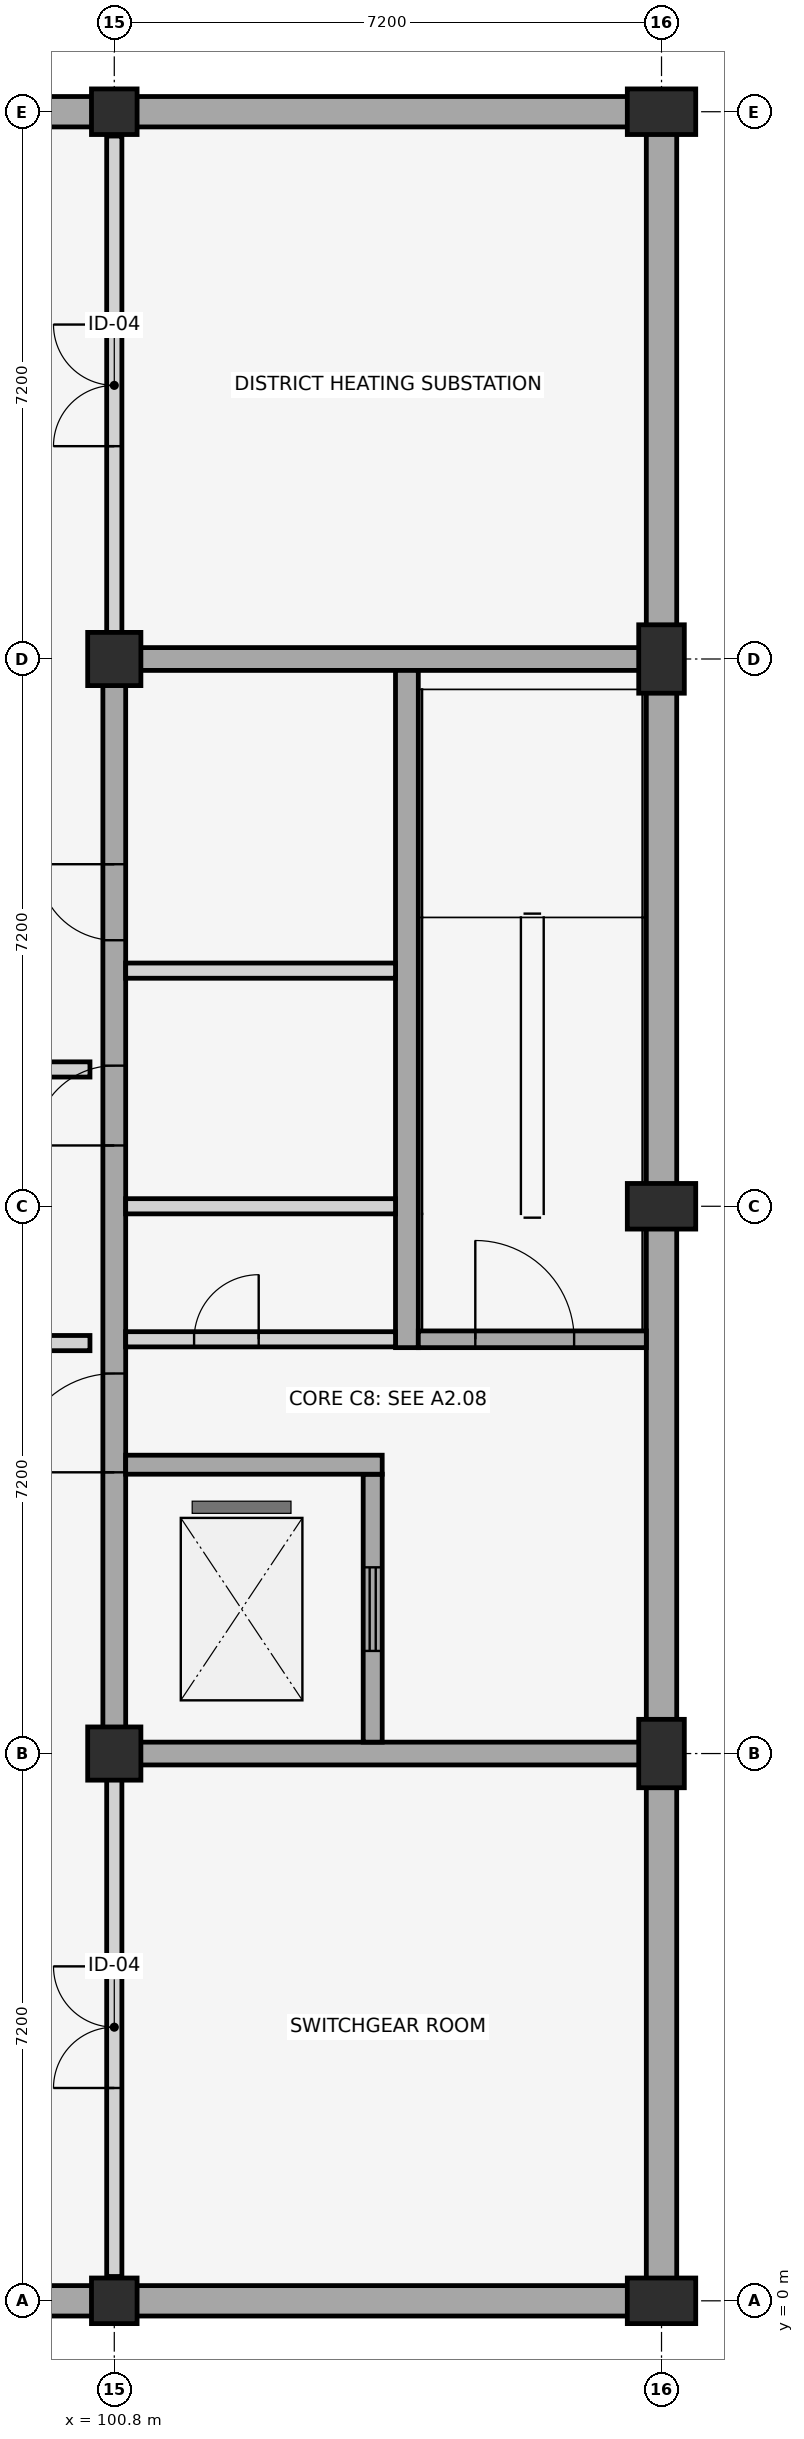
"""IFC4 building model, lengths in metres.
Left out: names, types, materials, properties, quantities, classifications, styles, units other than length and angle.
Written with IfcOpenShell. Run it as: python <this file> out.ifc"""

import sys

from ifc_helpers import new_model, si_unit, direction, frame, frame_2d, origin, origin_2d, place, context, subcontext, project, spatial, rectangle, extrude, element, fill, save


model = new_model("IFC4")
c1 = context("Model", 3, precision=1e-05, world=origin(), true_north=direction((0.0, 1.0)))
c2 = subcontext(c1, "Body", "Model", "MODEL_VIEW")
j1 = project(units=[si_unit("LENGTHUNIT", "METRE"), si_unit("PLANEANGLEUNIT", "RADIAN")], contexts=[c1])
p1 = place(None, origin())
s1 = spatial("IfcSite", under=j1, at=p1, CompositionType="ELEMENT")
p2 = place(p1, origin())
s2 = spatial("IfcBuilding", under=s1, at=p2, CompositionType="ELEMENT")
p3 = place(p2, frame((0.0, 0.0, -4.5)))
s3 = spatial("IfcBuildingStorey", under=s2, at=p3, CompositionType="ELEMENT", Elevation=-4.5)
p4 = place(p3, frame((57.4, 0.0, 0.0), z_axis=(0.0, 0.0, 1.0), x_axis=(1.0, 0.0, 0.0)))
e1 = element("IfcWall", 1, at=p4, inside=s3, PredefinedType="USERDEFINED", context=c2, shape_type="SweptSolid", body=[
    extrude(rectangle(XDim=50.8, YDim=0.4, at=frame_2d((25.4, 0.0))), origin(), (0.0, 0.0, 1.0), 3.67),
])
p5 = place(p3, frame((108.0, 0.2, 0.0), z_axis=(0.0, 0.0, 1.0), x_axis=(0.0, 1.0, 0.0)))
e2 = element("IfcWall", 2, at=p5, inside=s3, PredefinedType="USERDEFINED", context=c2, shape_type="SweptSolid", body=[
    extrude(rectangle(XDim=28.4, YDim=0.4, at=frame_2d((14.2, 0.0))), origin(), (0.0, 0.0, 1.0), 3.67),
])
p6 = place(p3, frame((108.2, 28.8, 0.0), z_axis=(0.0, 0.0, 1.0), x_axis=(-1.0, 0.0, 0.0)))
e3 = element("IfcWall", 3, at=p6, inside=s3, PredefinedType="USERDEFINED", context=c2, shape_type="SweptSolid", body=[
    extrude(rectangle(XDim=50.8, YDim=0.4, at=frame_2d((25.4, 0.0))), origin(), (0.0, 0.0, 1.0), 3.67),
])
p7 = place(p6, frame((24.3, 0.0, 0.0)))
e4 = element("IfcOpeningElement", 4, at=p7, cuts=e3, PredefinedType="OPENING", context=c2, shape_type="SweptSolid", body=[
    extrude(rectangle(XDim=1.8, YDim=2.4, at=frame_2d((0.9, 1.2))), frame((0.0, 0.21, 0.0), z_axis=(0.0, -1.0, 0.0), x_axis=(1.0, 0.0, 0.0)), (0.0, 0.0, 1.0), 0.42),
])
p8 = place(p3, frame((100.8, 0.0, -0.45), z_axis=(0.0, 0.0, 1.0), x_axis=(1.0, 0.0, 0.0)))
e5 = element("IfcColumn", 5, at=p8, inside=s3, PredefinedType="COLUMN", context=c2, shape_type="SweptSolid", body=[
    extrude(rectangle(XDim=0.6, YDim=0.6, at=origin_2d()), origin(), (0.0, 0.0, 1.0), 4.95),
])
for number, where, z_axis, x_axis in (
    (6, (100.8, 7.2, -0.45), (0.0, 0.0, 1.0), (0.0, 1.0, 0.0)),
    (7, (100.8, 21.6, -0.45), (0.0, 0.0, 1.0), (0.0, 1.0, 0.0)),
):
    element("IfcColumn", number, at=place(p3, frame(where, z_axis=z_axis, x_axis=x_axis)), inside=s3, PredefinedType="COLUMN", context=c2, shape_type="SweptSolid", body=[
        extrude(rectangle(XDim=0.7, YDim=0.7, at=origin_2d()), origin(), (0.0, 0.0, 1.0), 4.95),
    ])
p9 = place(p3, frame((100.8, 28.8, -0.45), z_axis=(0.0, 0.0, 1.0), x_axis=(1.0, 0.0, 0.0)))
e8 = element("IfcColumn", 8, at=p9, inside=s3, PredefinedType="COLUMN", context=c2, shape_type="SweptSolid", body=[
    extrude(rectangle(XDim=0.6, YDim=0.6, at=origin_2d()), origin(), (0.0, 0.0, 1.0), 4.95),
])
for number, where, z_axis, x_axis in (
    (9, (108.0, 0.0, -0.45), (0.0, 0.0, 1.0), (0.0, 1.0, 0.0)),
    (10, (108.0, 7.2, -0.45), (0.0, 0.0, 1.0), (1.0, 0.0, 0.0)),
    (11, (108.0, 14.4, -0.45), (0.0, 0.0, 1.0), (0.0, 1.0, 0.0)),
    (12, (108.0, 21.6, -0.45), (0.0, 0.0, 1.0), (1.0, 0.0, 0.0)),
    (13, (108.0, 28.8, -0.45), (0.0, 0.0, 1.0), (0.0, 1.0, 0.0)),
):
    element("IfcColumn", number, at=place(p3, frame(where, z_axis=z_axis, x_axis=x_axis)), inside=s3, PredefinedType="PILASTER", context=c2, shape_type="SweptSolid", body=[
        extrude(rectangle(XDim=0.6, YDim=0.9, at=origin_2d()), origin(), (0.0, 0.0, 1.0), 4.95),
    ])
for number, where, z_axis, x_axis in (
    (14, (100.65, 7.2, 0.0), (0.0, 0.0, 1.0), (1.0, 0.0, 0.0)),
    (15, (100.65, 21.6, 0.0), (0.0, 0.0, 1.0), (1.0, 0.0, 0.0)),
):
    element("IfcWall", number, at=place(p3, frame(where, z_axis=z_axis, x_axis=x_axis)), inside=s3, PredefinedType="SHEAR", context=c2, shape_type="SweptSolid", body=[
        extrude(rectangle(XDim=7.15, YDim=0.3, at=frame_2d((3.575, 0.0))), origin(), (0.0, 0.0, 1.0), 4.25),
    ])
p10 = place(p3, frame((100.8, 7.35, 0.0), z_axis=(0.0, 0.0, 1.0), x_axis=(0.0, 1.0, 0.0)))
e16 = element("IfcWall", 16, at=p10, inside=s3, PredefinedType="SHEAR", context=c2, shape_type="SweptSolid", body=[
    extrude(rectangle(XDim=14.1, YDim=0.3, at=frame_2d((7.05, 0.0))), origin(), (0.0, 0.0, 1.0), 4.25),
])
p11 = place(p10, frame((3.55, 0.0, 0.0)))
e17 = element("IfcOpeningElement", 17, at=p11, cuts=e16, PredefinedType="OPENING", context=c2, shape_type="SweptSolid", body=[
    extrude(rectangle(XDim=1.3, YDim=2.2, at=frame_2d((0.65, 1.1))), frame((0.0, 0.16, 0.0), z_axis=(0.0, -1.0, 0.0), x_axis=(1.0, 0.0, 0.0)), (0.0, 0.0, 1.0), 0.32),
])
p12 = place(p10, frame((7.85, 0.0, 0.0)))
e18 = element("IfcOpeningElement", 18, at=p12, cuts=e16, PredefinedType="OPENING", context=c2, shape_type="SweptSolid", body=[
    extrude(rectangle(XDim=1.05, YDim=2.15, at=frame_2d((0.525, 1.075))), frame((0.0, 0.16, 0.0), z_axis=(0.0, -1.0, 0.0), x_axis=(1.0, 0.0, 0.0)), (0.0, 0.0, 1.0), 0.32),
])
p13 = place(p10, frame((10.55, 0.0, 0.0)))
e19 = element("IfcOpeningElement", 19, at=p13, cuts=e16, PredefinedType="OPENING", context=c2, shape_type="SweptSolid", body=[
    extrude(rectangle(XDim=1.0, YDim=2.15, at=frame_2d((0.5, 1.075))), frame((0.0, 0.16, 0.0), z_axis=(0.0, -1.0, 0.0), x_axis=(1.0, 0.0, 0.0)), (0.0, 0.0, 1.0), 0.32),
])
p14 = place(p3, frame((104.2, 7.35, 0.0), z_axis=(0.0, 0.0, 1.0), x_axis=(0.0, 1.0, 0.0)))
e20 = element("IfcWall", 20, at=p14, inside=s3, PredefinedType="SHEAR", context=c2, shape_type="SweptSolid", body=[
    extrude(rectangle(XDim=3.525, YDim=0.25, at=frame_2d((1.762, 0.0))), origin(), (0.0, 0.0, 1.0), 4.25),
])
p15 = place(p14, frame((1.2, 0.0, 0.0)))
e21 = element("IfcOpeningElement", 21, at=p15, cuts=e20, PredefinedType="OPENING", context=c2, shape_type="SweptSolid", body=[
    extrude(rectangle(XDim=1.1, YDim=2.15, at=frame_2d((0.55, 1.075))), frame((0.0, 0.135, 0.0), z_axis=(0.0, -1.0, 0.0), x_axis=(1.0, 0.0, 0.0)), (0.0, 0.0, 1.0), 0.27),
])
p16 = place(p3, frame((104.65, 12.54, 0.0), z_axis=(0.0, 0.0, 1.0), x_axis=(0.0, 1.0, 0.0)))
e22 = element("IfcWall", 22, at=p16, inside=s3, PredefinedType="SHEAR", context=c2, shape_type="SweptSolid", body=[
    extrude(rectangle(XDim=8.91, YDim=0.3, at=frame_2d((4.455, 0.0))), origin(), (0.0, 0.0, 1.0), 4.25),
])
p17 = place(p3, frame((100.95, 12.65, 0.0), z_axis=(0.0, 0.0, 1.0), x_axis=(1.0, 0.0, 0.0)))
e23 = element("IfcWall", 23, at=p17, inside=s3, PredefinedType="PLUMBINGWALL", context=c2, shape_type="SweptSolid", body=[
    extrude(rectangle(XDim=3.55, YDim=0.2, at=frame_2d((1.775, 0.0))), origin(), (0.0, 0.0, 1.0), 3.67),
])
p18 = place(p17, frame((0.9, 0.0, 0.0)))
e24 = element("IfcOpeningElement", 24, at=p18, cuts=e23, PredefinedType="OPENING", context=c2, shape_type="SweptSolid", body=[
    extrude(rectangle(XDim=0.85, YDim=2.05, at=frame_2d((0.425, 1.025))), frame((0.0, 0.11, 0.0), z_axis=(0.0, -1.0, 0.0), x_axis=(1.0, 0.0, 0.0)), (0.0, 0.0, 1.0), 0.22),
])
p19 = place(p3, frame((104.8, 12.65, 0.0), z_axis=(0.0, 0.0, 1.0), x_axis=(1.0, 0.0, 0.0)))
e25 = element("IfcWall", 25, at=p19, inside=s3, PredefinedType="SHEAR", context=c2, shape_type="SweptSolid", body=[
    extrude(rectangle(XDim=3.0, YDim=0.22, at=frame_2d((1.5, 0.0))), origin(), (0.0, 0.0, 1.0), 4.25),
])
p20 = place(p19, frame((0.75, 0.0, 0.0)))
e26 = element("IfcOpeningElement", 26, at=p20, cuts=e25, PredefinedType="OPENING", context=c2, shape_type="SweptSolid", body=[
    extrude(rectangle(XDim=1.3, YDim=2.2, at=frame_2d((0.65, 1.1))), frame((0.0, 0.12, 0.0), z_axis=(0.0, -1.0, 0.0), x_axis=(1.0, 0.0, 0.0)), (0.0, 0.0, 1.0), 0.24),
])
p21 = place(p3, frame((100.95, 11.0, 0.0), z_axis=(0.0, 0.0, 1.0), x_axis=(1.0, 0.0, 0.0)))
e27 = element("IfcWall", 27, at=p21, inside=s3, PredefinedType="SHEAR", context=c2, shape_type="SweptSolid", body=[
    extrude(rectangle(XDim=3.375, YDim=0.25, at=frame_2d((1.688, 0.0))), origin(), (0.0, 0.0, 1.0), 4.25),
])
for number, where, z_axis, x_axis in (
    (28, (100.95, 14.4, 0.0), (0.0, 0.0, 1.0), (1.0, 0.0, 0.0)),
    (29, (100.95, 17.5, 0.0), (0.0, 0.0, 1.0), (1.0, 0.0, 0.0)),
):
    element("IfcWall", number, at=place(p3, frame(where, z_axis=z_axis, x_axis=x_axis)), inside=s3, PredefinedType="PLUMBINGWALL", context=c2, shape_type="SweptSolid", body=[
        extrude(rectangle(XDim=3.55, YDim=0.2, at=frame_2d((1.775, 0.0))), origin(), (0.0, 0.0, 1.0), 3.67),
    ])
p22 = place(p3, frame((93.92, 12.6, 0.0), z_axis=(0.0, 0.0, 1.0), x_axis=(1.0, 0.0, 0.0)))
e30 = element("IfcWall", 30, at=p22, inside=s3, PredefinedType="PARTITIONING", context=c2, shape_type="SweptSolid", body=[
    extrude(rectangle(XDim=6.56, YDim=0.2, at=frame_2d((3.28, 0.0))), origin(), (0.0, 0.0, 1.0), 3.45),
])
p23 = place(p22, frame((2.53, 0.0, 0.0)))
e31 = element("IfcOpeningElement", 31, at=p23, cuts=e30, PredefinedType="OPENING", context=c2, shape_type="SweptSolid", body=[
    extrude(rectangle(XDim=1.5, YDim=2.25, at=frame_2d((0.75, 1.125))), frame((0.0, 0.11, 0.0), z_axis=(0.0, -1.0, 0.0), x_axis=(1.0, 0.0, 0.0)), (0.0, 0.0, 1.0), 0.22),
])
p24 = place(p3, frame((93.92, 16.2, 0.0), z_axis=(0.0, 0.0, 1.0), x_axis=(1.0, 0.0, 0.0)))
e32 = element("IfcWall", 32, at=p24, inside=s3, PredefinedType="PARTITIONING", context=c2, shape_type="SweptSolid", body=[
    extrude(rectangle(XDim=6.56, YDim=0.2, at=frame_2d((3.28, 0.0))), origin(), (0.0, 0.0, 1.0), 3.45),
])
p25 = place(p24, frame((2.48, 0.0, 0.0)))
e33 = element("IfcOpeningElement", 33, at=p25, cuts=e32, PredefinedType="OPENING", context=c2, shape_type="SweptSolid", body=[
    extrude(rectangle(XDim=1.6, YDim=2.35, at=frame_2d((0.8, 1.175))), frame((0.0, 0.11, 0.0), z_axis=(0.0, -1.0, 0.0), x_axis=(1.0, 0.0, 0.0)), (0.0, 0.0, 1.0), 0.22),
])
p26 = place(p3, frame((100.8, 0.32, 0.0), z_axis=(0.0, 0.0, 1.0), x_axis=(0.0, 1.0, 0.0)))
e34 = element("IfcWall", 34, at=p26, inside=s3, PredefinedType="PARTITIONING", context=c2, shape_type="SweptSolid", body=[
    extrude(rectangle(XDim=6.56, YDim=0.2, at=frame_2d((3.28, 0.0))), origin(), (0.0, 0.0, 1.0), 3.45),
])
p27 = place(p26, frame((2.48, 0.0, 0.0)))
e35 = element("IfcOpeningElement", 35, at=p27, cuts=e34, PredefinedType="OPENING", context=c2, shape_type="SweptSolid", body=[
    extrude(rectangle(XDim=1.6, YDim=2.35, at=frame_2d((0.8, 1.175))), frame((0.0, 0.11, 0.0), z_axis=(0.0, -1.0, 0.0), x_axis=(1.0, 0.0, 0.0)), (0.0, 0.0, 1.0), 0.22),
])
p28 = place(p3, frame((100.8, 21.92, 0.0), z_axis=(0.0, 0.0, 1.0), x_axis=(0.0, 1.0, 0.0)))
e36 = element("IfcWall", 36, at=p28, inside=s3, PredefinedType="PARTITIONING", context=c2, shape_type="SweptSolid", body=[
    extrude(rectangle(XDim=6.56, YDim=0.2, at=frame_2d((3.28, 0.0))), origin(), (0.0, 0.0, 1.0), 3.45),
])
p29 = place(p28, frame((2.48, 0.0, 0.0)))
e37 = element("IfcOpeningElement", 37, at=p29, cuts=e36, PredefinedType="OPENING", context=c2, shape_type="SweptSolid", body=[
    extrude(rectangle(XDim=1.6, YDim=2.35, at=frame_2d((0.8, 1.175))), frame((0.0, 0.11, 0.0), z_axis=(0.0, -1.0, 0.0), x_axis=(1.0, 0.0, 0.0)), (0.0, 0.0, 1.0), 0.22),
])
p30 = place(p11, origin())
e38 = element("IfcDoor", 38, at=p30, inside=s3, OperationType="SINGLE_SWING_LEFT", PredefinedType="DOOR", context=c2, shape_type="SweptSolid", body=[
    extrude(rectangle(XDim=1.3, YDim=2.2, at=frame_2d((0.65, 1.1))), frame((0.0, 0.025, 0.0), z_axis=(0.0, -1.0, 0.0), x_axis=(1.0, 0.0, 0.0)), (0.0, 0.0, 1.0), 0.05),
])
fill(e17, e38)
p31 = place(p12, origin())
e39 = element("IfcDoor", 39, at=p31, inside=s3, OperationType="SINGLE_SWING_LEFT", PredefinedType="DOOR", context=c2, shape_type="SweptSolid", body=[
    extrude(rectangle(XDim=1.05, YDim=2.15, at=frame_2d((0.525, 1.075))), frame((0.0, 0.025, 0.0), z_axis=(0.0, -1.0, 0.0), x_axis=(1.0, 0.0, 0.0)), (0.0, 0.0, 1.0), 0.05),
])
fill(e18, e39)
p32 = place(p13, origin())
e40 = element("IfcDoor", 40, at=p32, inside=s3, OperationType="SINGLE_SWING_RIGHT", PredefinedType="DOOR", context=c2, shape_type="SweptSolid", body=[
    extrude(rectangle(XDim=1.0, YDim=2.15, at=frame_2d((0.5, 1.075))), frame((0.0, 0.025, 0.0), z_axis=(0.0, -1.0, 0.0), x_axis=(1.0, 0.0, 0.0)), (0.0, 0.0, 1.0), 0.05),
])
fill(e19, e40)
p33 = place(p15, origin())
e41 = element("IfcDoor", 41, at=p33, inside=s3, OperationType="SLIDING_TO_LEFT", PredefinedType="DOOR", context=c2, shape_type="SweptSolid", body=[
    extrude(rectangle(XDim=1.1, YDim=2.15, at=frame_2d((0.55, 1.075))), frame((0.0, 0.025, 0.0), z_axis=(0.0, -1.0, 0.0), x_axis=(1.0, 0.0, 0.0)), (0.0, 0.0, 1.0), 0.05),
])
fill(e21, e41)
p34 = place(p18, origin())
e42 = element("IfcDoor", 42, at=p34, inside=s3, OperationType="SINGLE_SWING_RIGHT", PredefinedType="TRAPDOOR", context=c2, shape_type="SweptSolid", body=[
    extrude(rectangle(XDim=0.85, YDim=2.05, at=frame_2d((0.425, 1.025))), frame((0.0, 0.025, 0.0), z_axis=(0.0, -1.0, 0.0), x_axis=(1.0, 0.0, 0.0)), (0.0, 0.0, 1.0), 0.05),
])
fill(e24, e42)
p35 = place(p20, origin())
e43 = element("IfcDoor", 43, at=p35, inside=s3, OperationType="SINGLE_SWING_LEFT", PredefinedType="DOOR", context=c2, shape_type="SweptSolid", body=[
    extrude(rectangle(XDim=1.3, YDim=2.2, at=frame_2d((0.65, 1.1))), frame((0.0, 0.025, 0.0), z_axis=(0.0, -1.0, 0.0), x_axis=(1.0, 0.0, 0.0)), (0.0, 0.0, 1.0), 0.05),
])
fill(e26, e43)
p36 = place(p27, origin())
e44 = element("IfcDoor", 44, at=p36, inside=s3, OperationType="DOUBLE_DOOR_SINGLE_SWING", PredefinedType="DOOR", context=c2, shape_type="SweptSolid", body=[
    extrude(rectangle(XDim=1.6, YDim=2.35, at=frame_2d((0.8, 1.175))), frame((0.0, 0.025, 0.0), z_axis=(0.0, -1.0, 0.0), x_axis=(1.0, 0.0, 0.0)), (0.0, 0.0, 1.0), 0.05),
])
fill(e35, e44)
p37 = place(p29, origin())
e45 = element("IfcDoor", 45, at=p37, inside=s3, OperationType="DOUBLE_DOOR_SINGLE_SWING", PredefinedType="DOOR", context=c2, shape_type="SweptSolid", body=[
    extrude(rectangle(XDim=1.6, YDim=2.35, at=frame_2d((0.8, 1.175))), frame((0.0, 0.025, 0.0), z_axis=(0.0, -1.0, 0.0), x_axis=(1.0, 0.0, 0.0)), (0.0, 0.0, 1.0), 0.05),
])
fill(e37, e45)
save(model, sys.argv[1])
